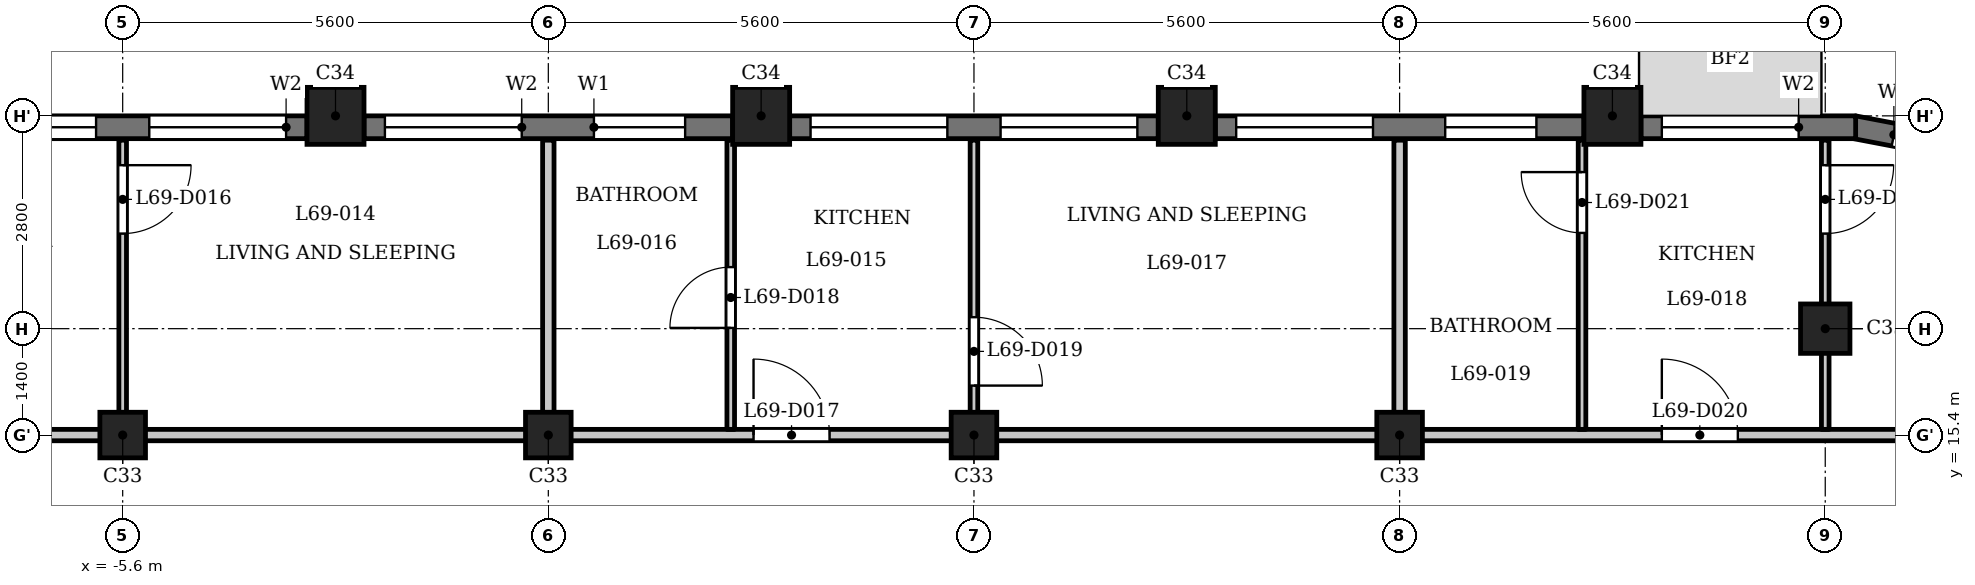
"""IFC4 building model, lengths in metres.
Left out: names, types, materials, properties, quantities, classifications, styles, units other than length and angle.
Written with IfcOpenShell. Run it as: python <this file> out.ifc"""

import sys

from ifc_helpers import new_model, si_unit, direction, frame, frame_2d, origin, origin_2d, place, context, subcontext, project, spatial, rectangle, extrude, element, fill, save


model = new_model("IFC4")
c1 = context("Model", 3, precision=1e-05, world=origin(), true_north=direction((0.0, 1.0)))
c2 = subcontext(c1, "Body", "Model", "MODEL_VIEW")
j1 = project(units=[si_unit("LENGTHUNIT", "METRE"), si_unit("PLANEANGLEUNIT", "RADIAN")], contexts=[c1])
p1 = place(None, origin())
s1 = spatial("IfcSite", under=j1, at=p1, CompositionType="ELEMENT")
p2 = place(p1, origin())
s2 = spatial("IfcBuilding", under=s1, at=p2, CompositionType="ELEMENT")
p3 = place(p2, frame((0.0, 0.0, 266.2)))
s3 = spatial("IfcBuildingStorey", under=s2, at=p3, CompositionType="ELEMENT", Elevation=266.2)
for number, where, z_axis, x_axis in (
    (1, (14.0, 19.6, 0.0), (0.0, 0.0, 1.0), (1.0, 0.0, 0.0)),
    (2, (8.4, 19.6, 0.0), (0.0, 0.0, 1.0), (1.0, 0.0, 0.0)),
    (3, (2.8, 19.6, 0.0), (0.0, 0.0, 1.0), (1.0, 0.0, 0.0)),
    (4, (-2.8, 19.6, 0.0), (0.0, 0.0, 1.0), (1.0, 0.0, 0.0)),
):
    element("IfcColumn", number, at=place(p3, frame(where, z_axis=z_axis, x_axis=x_axis)), inside=s3, PredefinedType="COLUMN", context=c2, shape_type="SweptSolid", body=[
        extrude(rectangle(XDim=0.75, YDim=0.75, at=origin_2d()), origin(), (0.0, 0.0, 1.0), 3.5),
    ])
p4 = place(p3, frame((16.8, 16.8, 0.0), z_axis=(0.0, 0.0, 1.0), x_axis=(1.0, 0.0, 0.0)))
e5 = element("IfcColumn", 5, at=p4, inside=s3, PredefinedType="COLUMN", context=c2, shape_type="SweptSolid", body=[
    extrude(rectangle(XDim=0.65, YDim=0.65, at=origin_2d()), origin(), (0.0, 0.0, 1.0), 3.5),
])
for number, where, z_axis, x_axis in (
    (6, (-5.6, 15.4, 0.0), (0.0, 0.0, 1.0), (1.0, 0.0, 0.0)),
    (7, (0.0, 15.4, 0.0), (0.0, 0.0, 1.0), (1.0, 0.0, 0.0)),
    (8, (5.6, 15.4, 0.0), (0.0, 0.0, 1.0), (1.0, 0.0, 0.0)),
    (9, (11.2, 15.4, 0.0), (0.0, 0.0, 1.0), (1.0, 0.0, 0.0)),
):
    element("IfcColumn", number, at=place(p3, frame(where, z_axis=z_axis, x_axis=x_axis)), inside=s3, PredefinedType="COLUMN", context=c2, shape_type="SweptSolid", body=[
        extrude(rectangle(XDim=0.6, YDim=0.6, at=origin_2d()), origin(), (0.0, 0.0, 1.0), 3.5),
    ])
p5 = place(p3, frame((19.02, 19.1, 0.0), z_axis=(0.0, 0.0, 1.0), x_axis=(-0.982284001233, 0.187398348234, 0.0)))
e10 = element("IfcWall", 10, at=p5, inside=s3, PredefinedType="SOLIDWALL", context=c2, shape_type="SweptSolid", body=[
    extrude(rectangle(XDim=1.881, YDim=0.3, at=frame_2d((0.941, 0.0))), origin(), (0.0, 0.0, 1.0), 2.55),
])
p6 = place(p5, frame((0.541, 0.0, 0.6)))
e11 = element("IfcOpeningElement", 11, at=p6, cuts=e10, PredefinedType="OPENING", context=c2, shape_type="SweptSolid", body=[
    extrude(rectangle(XDim=0.8, YDim=1.55, at=frame_2d((0.4, 0.775))), frame((0.0, 0.16, 0.0), z_axis=(0.0, -1.0, 0.0), x_axis=(1.0, 0.0, 0.0)), (0.0, 0.0, 1.0), 0.32),
])
p7 = place(p3, frame((17.2, 19.45, 0.0), z_axis=(0.0, 0.0, 1.0), x_axis=(-1.0, 0.0, 0.0)))
e12 = element("IfcWall", 12, at=p7, inside=s3, PredefinedType="SOLIDWALL", context=c2, shape_type="SweptSolid", body=[
    extrude(rectangle(XDim=2.825, YDim=0.3, at=frame_2d((1.413, 0.0))), origin(), (0.0, 0.0, 1.0), 2.55),
])
p8 = place(p7, frame((0.75, 0.0, 0.9)))
e13 = element("IfcOpeningElement", 13, at=p8, cuts=e12, PredefinedType="OPENING", context=c2, shape_type="SweptSolid", body=[
    extrude(rectangle(XDim=1.8, YDim=1.25, at=frame_2d((0.9, 0.625))), frame((0.0, 0.16, 0.0), z_axis=(0.0, -1.0, 0.0), x_axis=(1.0, 0.0, 0.0)), (0.0, 0.0, 1.0), 0.32),
])
p9 = place(p3, frame((13.625, 19.45, 0.0), z_axis=(0.0, 0.0, 1.0), x_axis=(-1.0, 0.0, 0.0)))
e14 = element("IfcWall", 14, at=p9, inside=s3, PredefinedType="SOLIDWALL", context=c2, shape_type="SweptSolid", body=[
    extrude(rectangle(XDim=4.85, YDim=0.3, at=frame_2d((2.425, 0.0))), origin(), (0.0, 0.0, 1.0), 2.55),
])
p10 = place(p9, frame((0.625, 0.0, 0.6)))
e15 = element("IfcOpeningElement", 15, at=p10, cuts=e14, PredefinedType="OPENING", context=c2, shape_type="SweptSolid", body=[
    extrude(rectangle(XDim=1.2, YDim=1.55, at=frame_2d((0.6, 0.775))), frame((0.0, 0.16, 0.0), z_axis=(0.0, -1.0, 0.0), x_axis=(1.0, 0.0, 0.0)), (0.0, 0.0, 1.0), 0.32),
])
p11 = place(p9, frame((2.775, 0.0, 0.9)))
e16 = element("IfcOpeningElement", 16, at=p11, cuts=e14, PredefinedType="OPENING", context=c2, shape_type="SweptSolid", body=[
    extrude(rectangle(XDim=1.8, YDim=1.25, at=frame_2d((0.9, 0.625))), frame((0.0, 0.16, 0.0), z_axis=(0.0, -1.0, 0.0), x_axis=(1.0, 0.0, 0.0)), (0.0, 0.0, 1.0), 0.32),
])
p12 = place(p3, frame((8.025, 19.45, 0.0), z_axis=(0.0, 0.0, 1.0), x_axis=(-1.0, 0.0, 0.0)))
e17 = element("IfcWall", 17, at=p12, inside=s3, PredefinedType="SOLIDWALL", context=c2, shape_type="SweptSolid", body=[
    extrude(rectangle(XDim=4.85, YDim=0.3, at=frame_2d((2.425, 0.0))), origin(), (0.0, 0.0, 1.0), 2.55),
])
p13 = place(p12, frame((0.275, 0.0, 0.9)))
e18 = element("IfcOpeningElement", 18, at=p13, cuts=e17, PredefinedType="OPENING", context=c2, shape_type="SweptSolid", body=[
    extrude(rectangle(XDim=1.8, YDim=1.25, at=frame_2d((0.9, 0.625))), frame((0.0, 0.16, 0.0), z_axis=(0.0, -1.0, 0.0), x_axis=(1.0, 0.0, 0.0)), (0.0, 0.0, 1.0), 0.32),
])
p14 = place(p12, frame((2.775, 0.0, 0.9)))
e19 = element("IfcOpeningElement", 19, at=p14, cuts=e17, PredefinedType="OPENING", context=c2, shape_type="SweptSolid", body=[
    extrude(rectangle(XDim=1.8, YDim=1.25, at=frame_2d((0.9, 0.625))), frame((0.0, 0.16, 0.0), z_axis=(0.0, -1.0, 0.0), x_axis=(1.0, 0.0, 0.0)), (0.0, 0.0, 1.0), 0.32),
])
p15 = place(p3, frame((2.425, 19.45, 0.0), z_axis=(0.0, 0.0, 1.0), x_axis=(-1.0, 0.0, 0.0)))
e20 = element("IfcWall", 20, at=p15, inside=s3, PredefinedType="SOLIDWALL", context=c2, shape_type="SweptSolid", body=[
    extrude(rectangle(XDim=4.85, YDim=0.3, at=frame_2d((2.425, 0.0))), origin(), (0.0, 0.0, 1.0), 2.55),
])
p16 = place(p15, frame((0.625, 0.0, 0.6)))
e21 = element("IfcOpeningElement", 21, at=p16, cuts=e20, PredefinedType="OPENING", context=c2, shape_type="SweptSolid", body=[
    extrude(rectangle(XDim=1.2, YDim=1.55, at=frame_2d((0.6, 0.775))), frame((0.0, 0.16, 0.0), z_axis=(0.0, -1.0, 0.0), x_axis=(1.0, 0.0, 0.0)), (0.0, 0.0, 1.0), 0.32),
])
p17 = place(p15, frame((2.775, 0.0, 0.9)))
e22 = element("IfcOpeningElement", 22, at=p17, cuts=e20, PredefinedType="OPENING", context=c2, shape_type="SweptSolid", body=[
    extrude(rectangle(XDim=1.8, YDim=1.25, at=frame_2d((0.9, 0.625))), frame((0.0, 0.16, 0.0), z_axis=(0.0, -1.0, 0.0), x_axis=(1.0, 0.0, 0.0)), (0.0, 0.0, 1.0), 0.32),
])
p18 = place(p3, frame((-3.175, 19.45, 0.0), z_axis=(0.0, 0.0, 1.0), x_axis=(-1.0, 0.0, 0.0)))
e23 = element("IfcWall", 23, at=p18, inside=s3, PredefinedType="SOLIDWALL", context=c2, shape_type="SweptSolid", body=[
    extrude(rectangle(XDim=4.85, YDim=0.3, at=frame_2d((2.425, 0.0))), origin(), (0.0, 0.0, 1.0), 2.55),
])
p19 = place(p18, frame((0.275, 0.0, 0.9)))
e24 = element("IfcOpeningElement", 24, at=p19, cuts=e23, PredefinedType="OPENING", context=c2, shape_type="SweptSolid", body=[
    extrude(rectangle(XDim=1.8, YDim=1.25, at=frame_2d((0.9, 0.625))), frame((0.0, 0.16, 0.0), z_axis=(0.0, -1.0, 0.0), x_axis=(1.0, 0.0, 0.0)), (0.0, 0.0, 1.0), 0.32),
])
p20 = place(p18, frame((2.775, 0.0, 0.9)))
e25 = element("IfcOpeningElement", 25, at=p20, cuts=e23, PredefinedType="OPENING", context=c2, shape_type="SweptSolid", body=[
    extrude(rectangle(XDim=1.8, YDim=1.25, at=frame_2d((0.9, 0.625))), frame((0.0, 0.16, 0.0), z_axis=(0.0, -1.0, 0.0), x_axis=(1.0, 0.0, 0.0)), (0.0, 0.0, 1.0), 0.32),
])
p21 = place(p3, frame((-23.55, 15.4, 0.0), z_axis=(0.0, 0.0, 1.0), x_axis=(1.0, 0.0, 0.0)))
e26 = element("IfcWall", 26, at=p21, inside=s3, PredefinedType="PARTITIONING", context=c2, shape_type="SweptSolid", body=[
    extrude(rectangle(XDim=46.872, YDim=0.15, at=frame_2d((23.436, 0.0))), origin(), (0.0, 0.0, 1.0), 3.2),
])
p22 = place(p21, frame((8.05, 0.0, 0.0)))
e27 = element("IfcOpeningElement", 27, at=p22, cuts=e26, PredefinedType="OPENING", context=c2, shape_type="SweptSolid", body=[
    extrude(rectangle(XDim=1.0, YDim=2.1, at=frame_2d((0.5, 1.05))), frame((0.0, 0.085, 0.0), z_axis=(0.0, -1.0, 0.0), x_axis=(1.0, 0.0, 0.0)), (0.0, 0.0, 1.0), 0.17),
])
p23 = place(p21, frame((15.05, 0.0, 0.0)))
e28 = element("IfcOpeningElement", 28, at=p23, cuts=e26, PredefinedType="OPENING", context=c2, shape_type="SweptSolid", body=[
    extrude(rectangle(XDim=1.0, YDim=2.1, at=frame_2d((0.5, 1.05))), frame((0.0, 0.085, 0.0), z_axis=(0.0, -1.0, 0.0), x_axis=(1.0, 0.0, 0.0)), (0.0, 0.0, 1.0), 0.17),
])
p24 = place(p21, frame((26.25, 0.0, 0.0)))
e29 = element("IfcOpeningElement", 29, at=p24, cuts=e26, PredefinedType="OPENING", context=c2, shape_type="SweptSolid", body=[
    extrude(rectangle(XDim=1.0, YDim=2.1, at=frame_2d((0.5, 1.05))), frame((0.0, 0.085, 0.0), z_axis=(0.0, -1.0, 0.0), x_axis=(1.0, 0.0, 0.0)), (0.0, 0.0, 1.0), 0.17),
])
p25 = place(p21, frame((38.2, 0.0, 0.0)))
e30 = element("IfcOpeningElement", 30, at=p25, cuts=e26, PredefinedType="OPENING", context=c2, shape_type="SweptSolid", body=[
    extrude(rectangle(XDim=1.0, YDim=2.1, at=frame_2d((0.5, 1.05))), frame((0.0, 0.085, 0.0), z_axis=(0.0, -1.0, 0.0), x_axis=(1.0, 0.0, 0.0)), (0.0, 0.0, 1.0), 0.17),
])
p26 = place(p3, frame((-5.6, 15.475, 0.0), z_axis=(0.0, 0.0, 1.0), x_axis=(0.0, 1.0, 0.0)))
e31 = element("IfcWall", 31, at=p26, inside=s3, PredefinedType="PARTITIONING", context=c2, shape_type="SweptSolid", body=[
    extrude(rectangle(XDim=3.805, YDim=0.1, at=frame_2d((1.902, 0.0))), origin(), (0.0, 0.0, 1.0), 3.2),
])
p27 = place(p26, frame((2.576, 0.0, 0.0)))
e32 = element("IfcOpeningElement", 32, at=p27, cuts=e31, PredefinedType="OPENING", context=c2, shape_type="SweptSolid", body=[
    extrude(rectangle(XDim=0.9, YDim=2.1, at=frame_2d((0.45, 1.05))), frame((0.0, 0.06, 0.0), z_axis=(0.0, -1.0, 0.0), x_axis=(1.0, 0.0, 0.0)), (0.0, 0.0, 1.0), 0.12),
])
p28 = place(p3, frame((0.0, 15.475, 0.0), z_axis=(0.0, 0.0, 1.0), x_axis=(0.0, 1.0, 0.0)))
e33 = element("IfcWall", 33, at=p28, inside=s3, PredefinedType="PARTITIONING", context=c2, shape_type="SweptSolid", body=[
    extrude(rectangle(XDim=3.805, YDim=0.15, at=frame_2d((1.902, 0.0))), origin(), (0.0, 0.0, 1.0), 3.2),
])
p29 = place(p3, frame((2.4, 15.475, 0.0), z_axis=(0.0, 0.0, 1.0), x_axis=(0.0, 1.0, 0.0)))
e34 = element("IfcWall", 34, at=p29, inside=s3, PredefinedType="PARTITIONING", context=c2, shape_type="SweptSolid", body=[
    extrude(rectangle(XDim=3.805, YDim=0.1, at=frame_2d((1.902, 0.0))), origin(), (0.0, 0.0, 1.0), 3.2),
])
p30 = place(p29, frame((1.335, 0.0, 0.0)))
e35 = element("IfcOpeningElement", 35, at=p30, cuts=e34, PredefinedType="OPENING", context=c2, shape_type="SweptSolid", body=[
    extrude(rectangle(XDim=0.8, YDim=2.1, at=frame_2d((0.4, 1.05))), frame((0.0, 0.06, 0.0), z_axis=(0.0, -1.0, 0.0), x_axis=(1.0, 0.0, 0.0)), (0.0, 0.0, 1.0), 0.12),
])
p31 = place(p3, frame((5.6, 15.475, 0.0), z_axis=(0.0, 0.0, 1.0), x_axis=(0.0, 1.0, 0.0)))
e36 = element("IfcWall", 36, at=p31, inside=s3, PredefinedType="PARTITIONING", context=c2, shape_type="SweptSolid", body=[
    extrude(rectangle(XDim=3.805, YDim=0.1, at=frame_2d((1.902, 0.0))), origin(), (0.0, 0.0, 1.0), 3.2),
])
p32 = place(p31, frame((0.576, 0.0, 0.0)))
e37 = element("IfcOpeningElement", 37, at=p32, cuts=e36, PredefinedType="OPENING", context=c2, shape_type="SweptSolid", body=[
    extrude(rectangle(XDim=0.9, YDim=2.1, at=frame_2d((0.45, 1.05))), frame((0.0, 0.06, 0.0), z_axis=(0.0, -1.0, 0.0), x_axis=(1.0, 0.0, 0.0)), (0.0, 0.0, 1.0), 0.12),
])
p33 = place(p3, frame((11.2, 15.475, 0.0), z_axis=(0.0, 0.0, 1.0), x_axis=(0.0, 1.0, 0.0)))
e38 = element("IfcWall", 38, at=p33, inside=s3, PredefinedType="PARTITIONING", context=c2, shape_type="SweptSolid", body=[
    extrude(rectangle(XDim=3.805, YDim=0.15, at=frame_2d((1.902, 0.0))), origin(), (0.0, 0.0, 1.0), 3.2),
])
p34 = place(p3, frame((13.6, 15.475, 0.0), z_axis=(0.0, 0.0, 1.0), x_axis=(0.0, 1.0, 0.0)))
e39 = element("IfcWall", 39, at=p34, inside=s3, PredefinedType="PARTITIONING", context=c2, shape_type="SweptSolid", body=[
    extrude(rectangle(XDim=3.805, YDim=0.1, at=frame_2d((1.902, 0.0))), origin(), (0.0, 0.0, 1.0), 3.2),
])
p35 = place(p34, frame((2.585, 0.0, 0.0)))
e40 = element("IfcOpeningElement", 40, at=p35, cuts=e39, PredefinedType="OPENING", context=c2, shape_type="SweptSolid", body=[
    extrude(rectangle(XDim=0.8, YDim=2.1, at=frame_2d((0.4, 1.05))), frame((0.0, 0.06, 0.0), z_axis=(0.0, -1.0, 0.0), x_axis=(1.0, 0.0, 0.0)), (0.0, 0.0, 1.0), 0.12),
])
p36 = place(p3, frame((16.8, 15.475, 0.0), z_axis=(0.0, 0.0, 1.0), x_axis=(0.0, 1.0, 0.0)))
e41 = element("IfcWall", 41, at=p36, inside=s3, PredefinedType="PARTITIONING", context=c2, shape_type="SweptSolid", body=[
    extrude(rectangle(XDim=3.805, YDim=0.1, at=frame_2d((1.902, 0.0))), origin(), (0.0, 0.0, 1.0), 3.2),
])
p37 = place(p36, frame((2.576, 0.0, 0.0)))
e42 = element("IfcOpeningElement", 42, at=p37, cuts=e41, PredefinedType="OPENING", context=c2, shape_type="SweptSolid", body=[
    extrude(rectangle(XDim=0.9, YDim=2.1, at=frame_2d((0.45, 1.05))), frame((0.0, 0.06, 0.0), z_axis=(0.0, -1.0, 0.0), x_axis=(1.0, 0.0, 0.0)), (0.0, 0.0, 1.0), 0.12),
])
p38 = place(p27, origin())
e43 = element("IfcDoor", 43, at=p38, inside=s3, OperationType="SINGLE_SWING_RIGHT", PredefinedType="DOOR", context=c2, shape_type="SweptSolid", body=[
    extrude(rectangle(XDim=0.9, YDim=2.1, at=frame_2d((0.45, 1.05))), frame((0.0, 0.025, 0.0), z_axis=(0.0, -1.0, 0.0), x_axis=(1.0, 0.0, 0.0)), (0.0, 0.0, 1.0), 0.05),
])
fill(e32, e43)
p39 = place(p24, origin())
e44 = element("IfcDoor", 44, at=p39, inside=s3, OperationType="SINGLE_SWING_RIGHT", PredefinedType="DOOR", context=c2, shape_type="SweptSolid", body=[
    extrude(rectangle(XDim=1.0, YDim=2.1, at=frame_2d((0.5, 1.05))), frame((0.0, 0.025, 0.0), z_axis=(0.0, -1.0, 0.0), x_axis=(1.0, 0.0, 0.0)), (0.0, 0.0, 1.0), 0.05),
])
fill(e29, e44)
p40 = place(p30, origin())
e45 = element("IfcDoor", 45, at=p40, inside=s3, OperationType="SINGLE_SWING_RIGHT", PredefinedType="DOOR", context=c2, shape_type="SweptSolid", body=[
    extrude(rectangle(XDim=0.8, YDim=2.1, at=frame_2d((0.4, 1.05))), frame((0.0, 0.025, 0.0), z_axis=(0.0, -1.0, 0.0), x_axis=(1.0, 0.0, 0.0)), (0.0, 0.0, 1.0), 0.05),
])
fill(e35, e45)
p41 = place(p32, origin())
e46 = element("IfcDoor", 46, at=p41, inside=s3, OperationType="SINGLE_SWING_LEFT", PredefinedType="DOOR", context=c2, shape_type="SweptSolid", body=[
    extrude(rectangle(XDim=0.9, YDim=2.1, at=frame_2d((0.45, 1.05))), frame((0.0, 0.025, 0.0), z_axis=(0.0, -1.0, 0.0), x_axis=(1.0, 0.0, 0.0)), (0.0, 0.0, 1.0), 0.05),
])
fill(e37, e46)
p42 = place(p25, origin())
e47 = element("IfcDoor", 47, at=p42, inside=s3, OperationType="SINGLE_SWING_RIGHT", PredefinedType="DOOR", context=c2, shape_type="SweptSolid", body=[
    extrude(rectangle(XDim=1.0, YDim=2.1, at=frame_2d((0.5, 1.05))), frame((0.0, 0.025, 0.0), z_axis=(0.0, -1.0, 0.0), x_axis=(1.0, 0.0, 0.0)), (0.0, 0.0, 1.0), 0.05),
])
fill(e30, e47)
p43 = place(p35, origin())
e48 = element("IfcDoor", 48, at=p43, inside=s3, OperationType="SINGLE_SWING_LEFT", PredefinedType="DOOR", context=c2, shape_type="SweptSolid", body=[
    extrude(rectangle(XDim=0.8, YDim=2.1, at=frame_2d((0.4, 1.05))), frame((0.0, 0.025, 0.0), z_axis=(0.0, -1.0, 0.0), x_axis=(1.0, 0.0, 0.0)), (0.0, 0.0, 1.0), 0.05),
])
fill(e40, e48)
p44 = place(p37, origin())
e49 = element("IfcDoor", 49, at=p44, inside=s3, OperationType="SINGLE_SWING_RIGHT", PredefinedType="DOOR", context=c2, shape_type="SweptSolid", body=[
    extrude(rectangle(XDim=0.9, YDim=2.1, at=frame_2d((0.45, 1.05))), frame((0.0, 0.025, 0.0), z_axis=(0.0, -1.0, 0.0), x_axis=(1.0, 0.0, 0.0)), (0.0, 0.0, 1.0), 0.05),
])
fill(e42, e49)
p45 = place(p6, origin())
e50 = element("IfcWindow", 50, at=p45, inside=s3, PartitioningType="SINGLE_PANEL", PredefinedType="WINDOW", context=c2, shape_type="SweptSolid", body=[
    extrude(rectangle(XDim=0.8, YDim=1.55, at=frame_2d((0.4, 0.775))), frame((0.0, 0.03, 0.0), z_axis=(0.0, -1.0, 0.0), x_axis=(1.0, 0.0, 0.0)), (0.0, 0.0, 1.0), 0.06),
])
fill(e11, e50)
p46 = place(p8, origin())
e51 = element("IfcWindow", 51, at=p46, inside=s3, PartitioningType="SINGLE_PANEL", PredefinedType="WINDOW", context=c2, shape_type="SweptSolid", body=[
    extrude(rectangle(XDim=1.8, YDim=1.25, at=frame_2d((0.9, 0.625))), frame((0.0, 0.03, 0.0), z_axis=(0.0, -1.0, 0.0), x_axis=(1.0, 0.0, 0.0)), (0.0, 0.0, 1.0), 0.06),
])
fill(e13, e51)
p47 = place(p10, origin())
e52 = element("IfcWindow", 52, at=p47, inside=s3, PartitioningType="SINGLE_PANEL", PredefinedType="WINDOW", context=c2, shape_type="SweptSolid", body=[
    extrude(rectangle(XDim=1.2, YDim=1.55, at=frame_2d((0.6, 0.775))), frame((0.0, 0.03, 0.0), z_axis=(0.0, -1.0, 0.0), x_axis=(1.0, 0.0, 0.0)), (0.0, 0.0, 1.0), 0.06),
])
fill(e15, e52)
p48 = place(p11, origin())
e53 = element("IfcWindow", 53, at=p48, inside=s3, PartitioningType="SINGLE_PANEL", PredefinedType="WINDOW", context=c2, shape_type="SweptSolid", body=[
    extrude(rectangle(XDim=1.8, YDim=1.25, at=frame_2d((0.9, 0.625))), frame((0.0, 0.03, 0.0), z_axis=(0.0, -1.0, 0.0), x_axis=(1.0, 0.0, 0.0)), (0.0, 0.0, 1.0), 0.06),
])
fill(e16, e53)
p49 = place(p13, origin())
e54 = element("IfcWindow", 54, at=p49, inside=s3, PartitioningType="SINGLE_PANEL", PredefinedType="WINDOW", context=c2, shape_type="SweptSolid", body=[
    extrude(rectangle(XDim=1.8, YDim=1.25, at=frame_2d((0.9, 0.625))), frame((0.0, 0.03, 0.0), z_axis=(0.0, -1.0, 0.0), x_axis=(1.0, 0.0, 0.0)), (0.0, 0.0, 1.0), 0.06),
])
fill(e18, e54)
p50 = place(p14, origin())
e55 = element("IfcWindow", 55, at=p50, inside=s3, PartitioningType="SINGLE_PANEL", PredefinedType="WINDOW", context=c2, shape_type="SweptSolid", body=[
    extrude(rectangle(XDim=1.8, YDim=1.25, at=frame_2d((0.9, 0.625))), frame((0.0, 0.03, 0.0), z_axis=(0.0, -1.0, 0.0), x_axis=(1.0, 0.0, 0.0)), (0.0, 0.0, 1.0), 0.06),
])
fill(e19, e55)
p51 = place(p16, origin())
e56 = element("IfcWindow", 56, at=p51, inside=s3, PartitioningType="SINGLE_PANEL", PredefinedType="WINDOW", context=c2, shape_type="SweptSolid", body=[
    extrude(rectangle(XDim=1.2, YDim=1.55, at=frame_2d((0.6, 0.775))), frame((0.0, 0.03, 0.0), z_axis=(0.0, -1.0, 0.0), x_axis=(1.0, 0.0, 0.0)), (0.0, 0.0, 1.0), 0.06),
])
fill(e21, e56)
p52 = place(p17, origin())
e57 = element("IfcWindow", 57, at=p52, inside=s3, PartitioningType="SINGLE_PANEL", PredefinedType="WINDOW", context=c2, shape_type="SweptSolid", body=[
    extrude(rectangle(XDim=1.8, YDim=1.25, at=frame_2d((0.9, 0.625))), frame((0.0, 0.03, 0.0), z_axis=(0.0, -1.0, 0.0), x_axis=(1.0, 0.0, 0.0)), (0.0, 0.0, 1.0), 0.06),
])
fill(e22, e57)
p53 = place(p19, origin())
e58 = element("IfcWindow", 58, at=p53, inside=s3, PartitioningType="SINGLE_PANEL", PredefinedType="WINDOW", context=c2, shape_type="SweptSolid", body=[
    extrude(rectangle(XDim=1.8, YDim=1.25, at=frame_2d((0.9, 0.625))), frame((0.0, 0.03, 0.0), z_axis=(0.0, -1.0, 0.0), x_axis=(1.0, 0.0, 0.0)), (0.0, 0.0, 1.0), 0.06),
])
fill(e24, e58)
p54 = place(p20, origin())
e59 = element("IfcWindow", 59, at=p54, inside=s3, PartitioningType="SINGLE_PANEL", PredefinedType="WINDOW", context=c2, shape_type="SweptSolid", body=[
    extrude(rectangle(XDim=1.8, YDim=1.25, at=frame_2d((0.9, 0.625))), frame((0.0, 0.03, 0.0), z_axis=(0.0, -1.0, 0.0), x_axis=(1.0, 0.0, 0.0)), (0.0, 0.0, 1.0), 0.06),
])
fill(e25, e59)
save(model, sys.argv[1])
